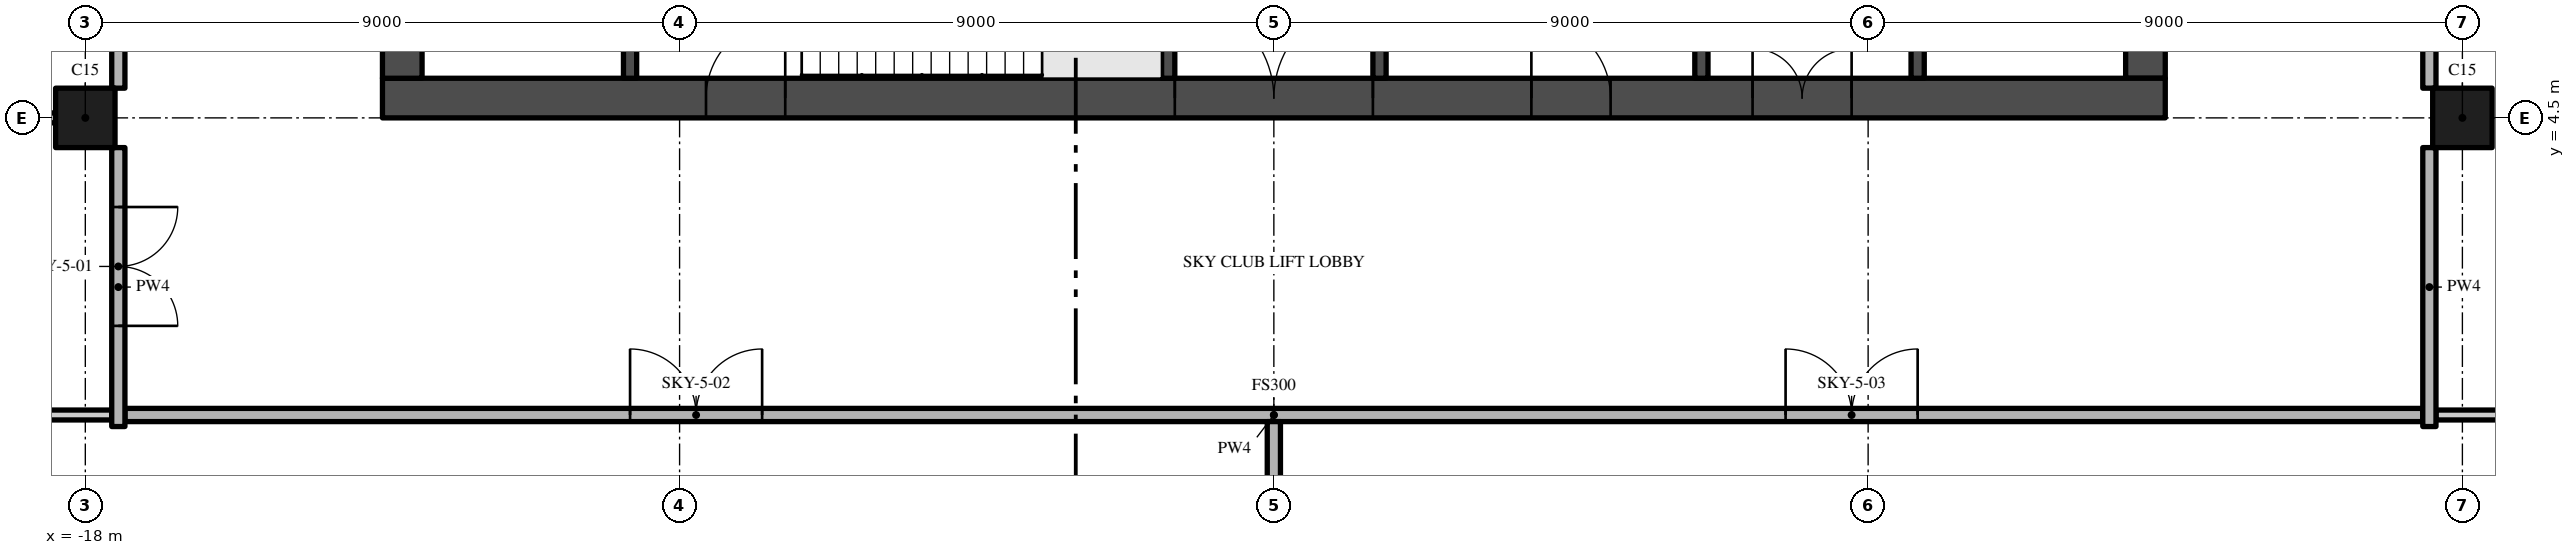
"""IFC4 building model, lengths in metres.
Left out: names, types, materials, properties, quantities, classifications, styles, units other than length and angle.
Written with IfcOpenShell. Run it as: python <this file> out.ifc"""

import sys

from ifc_helpers import new_model, si_unit, direction, frame, frame_2d, origin, origin_2d, place, context, subcontext, project, spatial, rectangle, extrude, element, fill, save


model = new_model("IFC4")
c1 = context("Model", 3, precision=1e-05, world=origin(), true_north=direction((0.0, 1.0)))
c2 = subcontext(c1, "Body", "Model", "MODEL_VIEW")
j1 = project(units=[si_unit("LENGTHUNIT", "METRE"), si_unit("PLANEANGLEUNIT", "RADIAN")], contexts=[c1])
p1 = place(None, origin())
s1 = spatial("IfcSite", under=j1, at=p1, CompositionType="ELEMENT")
p2 = place(p1, origin())
s2 = spatial("IfcBuilding", under=s1, at=p2, CompositionType="ELEMENT")
p3 = place(p2, frame((0.0, 0.0, 284.4)))
s3 = spatial("IfcBuildingStorey", under=s2, at=p3, CompositionType="ELEMENT", Elevation=284.4)
p4 = place(p3, frame((-13.5, 4.8, -0.3), z_axis=(0.0, 0.0, 1.0), x_axis=(1.0, 0.0, 0.0)))
e1 = element("IfcWall", 1, at=p4, inside=s3, PredefinedType="SHEAR", context=c2, shape_type="SweptSolid", body=[
    extrude(rectangle(XDim=27.0, YDim=0.6, at=frame_2d((13.5, 0.0))), origin(), (0.0, 0.0, 1.0), 5.0),
])
p5 = place(p4, frame((12.0, 0.0, 0.3)))
e2 = element("IfcOpeningElement", 2, at=p5, cuts=e1, PredefinedType="OPENING", context=c2, shape_type="SweptSolid", body=[
    extrude(rectangle(XDim=3.0, YDim=2.4, at=frame_2d((1.5, 1.2))), frame((0.0, 0.31, 0.0), z_axis=(0.0, -1.0, 0.0), x_axis=(1.0, 0.0, 0.0)), (0.0, 0.0, 1.0), 0.62),
])
p6 = place(p4, frame((4.9, 0.0, 0.3)))
e3 = element("IfcOpeningElement", 3, at=p6, cuts=e1, PredefinedType="OPENING", context=c2, shape_type="SweptSolid", body=[
    extrude(rectangle(XDim=1.2, YDim=2.2, at=frame_2d((0.6, 1.1))), frame((0.0, 0.31, 0.0), z_axis=(0.0, -1.0, 0.0), x_axis=(1.0, 0.0, 0.0)), (0.0, 0.0, 1.0), 0.62),
])
p7 = place(p4, frame((20.75, 0.0, 0.3)))
e4 = element("IfcOpeningElement", 4, at=p7, cuts=e1, PredefinedType="OPENING", context=c2, shape_type="SweptSolid", body=[
    extrude(rectangle(XDim=1.5, YDim=2.2, at=frame_2d((0.75, 1.1))), frame((0.0, 0.31, 0.0), z_axis=(0.0, -1.0, 0.0), x_axis=(1.0, 0.0, 0.0)), (0.0, 0.0, 1.0), 0.62),
])
p8 = place(p4, frame((17.4, 0.0, 0.3)))
e5 = element("IfcOpeningElement", 5, at=p8, cuts=e1, PredefinedType="OPENING", context=c2, shape_type="SweptSolid", body=[
    extrude(rectangle(XDim=1.2, YDim=2.2, at=frame_2d((0.6, 1.1))), frame((0.0, 0.31, 0.0), z_axis=(0.0, -1.0, 0.0), x_axis=(1.0, 0.0, 0.0)), (0.0, 0.0, 1.0), 0.62),
])
p9 = place(p3, frame((13.2, 5.1, -0.3), z_axis=(0.0, 0.0, 1.0), x_axis=(0.0, 1.0, 0.0)))
e6 = element("IfcWall", 6, at=p9, inside=s3, PredefinedType="SHEAR", context=c2, shape_type="SweptSolid", body=[
    extrude(rectangle(XDim=16.8, YDim=0.6, at=frame_2d((8.4, 0.0))), origin(), (0.0, 0.0, 1.0), 5.0),
])
p10 = place(p9, frame((6.3, 0.0, 0.3)))
e7 = element("IfcOpeningElement", 7, at=p10, cuts=e6, PredefinedType="OPENING", context=c2, shape_type="SweptSolid", body=[
    extrude(rectangle(XDim=1.2, YDim=2.2, at=frame_2d((0.6, 1.1))), frame((0.0, 0.31, 0.0), z_axis=(0.0, -1.0, 0.0), x_axis=(1.0, 0.0, 0.0)), (0.0, 0.0, 1.0), 0.62),
])
p11 = place(p3, frame((-13.2, 21.9, -0.3), z_axis=(0.0, 0.0, 1.0), x_axis=(0.0, -1.0, 0.0)))
e8 = element("IfcWall", 8, at=p11, inside=s3, PredefinedType="SHEAR", context=c2, shape_type="SweptSolid", body=[
    extrude(rectangle(XDim=16.8, YDim=0.6, at=frame_2d((8.4, 0.0))), origin(), (0.0, 0.0, 1.0), 5.0),
])
p12 = place(p11, frame((9.3, 0.0, 0.3)))
e9 = element("IfcOpeningElement", 9, at=p12, cuts=e8, PredefinedType="OPENING", context=c2, shape_type="SweptSolid", body=[
    extrude(rectangle(XDim=1.2, YDim=2.2, at=frame_2d((0.6, 1.1))), frame((0.0, 0.31, 0.0), z_axis=(0.0, -1.0, 0.0), x_axis=(1.0, 0.0, 0.0)), (0.0, 0.0, 1.0), 0.62),
])
for number, where, z_axis, x_axis in (
    (10, (-18.0, 4.5, 0.0), (0.0, 0.0, 1.0), (1.0, 0.0, 0.0)),
    (11, (18.0, 4.5, 0.0), (0.0, 0.0, 1.0), (1.0, 0.0, 0.0)),
):
    element("IfcColumn", number, at=place(p3, frame(where, z_axis=z_axis, x_axis=x_axis)), inside=s3, PredefinedType="COLUMN", context=c2, shape_type="SweptSolid", body=[
        extrude(rectangle(XDim=0.9, YDim=0.9, at=origin_2d()), origin(), (0.0, 0.0, 1.0), 4.7),
    ])
for number, where, z_axis, x_axis in (
    (12, (-9.75, 5.1, 0.0), (0.0, 0.0, 1.0), (0.0, 1.0, 0.0)),
    (13, (-1.6, 5.1, 0.0), (0.0, 0.0, 1.0), (0.0, 1.0, 0.0)),
):
    element("IfcWall", number, at=place(p3, frame(where, z_axis=z_axis, x_axis=x_axis)), inside=s3, PredefinedType="SHEAR", context=c2, shape_type="SweptSolid", body=[
        extrude(rectangle(XDim=2.85, YDim=0.2, at=frame_2d((1.425, 0.0))), origin(), (0.0, 0.0, 1.0), 4.7),
    ])
p13 = place(p3, frame((1.6, 11.5, 0.0), z_axis=(0.0, 0.0, 1.0), x_axis=(0.0, -1.0, 0.0)))
e14 = element("IfcWall", 14, at=p13, inside=s3, PredefinedType="SHEAR", context=c2, shape_type="SweptSolid", body=[
    extrude(rectangle(XDim=6.4, YDim=0.2, at=frame_2d((3.2, 0.0))), origin(), (0.0, 0.0, 1.0), 4.7),
])
p14 = place(p13, frame((2.35, 0.0, 0.0)))
e15 = element("IfcOpeningElement", 15, at=p14, cuts=e14, PredefinedType="OPENING", context=c2, shape_type="SweptSolid", body=[
    extrude(rectangle(XDim=0.9, YDim=2.1, at=frame_2d((0.45, 1.05))), frame((0.0, 0.11, 0.0), z_axis=(0.0, -1.0, 0.0), x_axis=(1.0, 0.0, 0.0)), (0.0, 0.0, 1.0), 0.22),
])
p15 = place(p3, frame((6.475, 5.1, 0.0), z_axis=(0.0, 0.0, 1.0), x_axis=(0.0, 1.0, 0.0)))
e16 = element("IfcWall", 16, at=p15, inside=s3, PredefinedType="SHEAR", context=c2, shape_type="SweptSolid", body=[
    extrude(rectangle(XDim=6.4, YDim=0.2, at=frame_2d((3.2, 0.0))), origin(), (0.0, 0.0, 1.0), 4.7),
])
p16 = place(p3, frame((9.75, 5.1, 0.0), z_axis=(0.0, 0.0, 1.0), x_axis=(0.0, 1.0, 0.0)))
e17 = element("IfcWall", 17, at=p16, inside=s3, PredefinedType="SHEAR", context=c2, shape_type="SweptSolid", body=[
    extrude(rectangle(XDim=2.5, YDim=0.2, at=frame_2d((1.25, 0.0))), origin(), (0.0, 0.0, 1.0), 4.7),
])
p17 = place(p16, frame((0.85, 0.0, 0.0)))
e18 = element("IfcOpeningElement", 18, at=p17, cuts=e17, PredefinedType="OPENING", context=c2, shape_type="SweptSolid", body=[
    extrude(rectangle(XDim=1.1, YDim=2.1, at=frame_2d((0.55, 1.05))), frame((0.0, 0.11, 0.0), z_axis=(0.0, -1.0, 0.0), x_axis=(1.0, 0.0, 0.0)), (0.0, 0.0, 1.0), 0.22),
])
p18 = place(p3, frame((-17.4, 0.0, 0.0), z_axis=(0.0, 0.0, 1.0), x_axis=(1.0, 0.0, 0.0)))
e19 = element("IfcWall", 19, at=p18, inside=s3, PredefinedType="PARTITIONING", context=c2, shape_type="SweptSolid", body=[
    extrude(rectangle(XDim=34.8, YDim=0.2, at=frame_2d((17.4, 0.0))), origin(), (0.0, 0.0, 1.0), 4.7),
])
p19 = place(p18, frame((7.65, 0.0, 0.0)))
e20 = element("IfcOpeningElement", 20, at=p19, cuts=e19, PredefinedType="OPENING", context=c2, shape_type="SweptSolid", body=[
    extrude(rectangle(XDim=2.0, YDim=2.4, at=frame_2d((1.0, 1.2))), frame((0.0, 0.11, 0.0), z_axis=(0.0, -1.0, 0.0), x_axis=(1.0, 0.0, 0.0)), (0.0, 0.0, 1.0), 0.22),
])
p20 = place(p18, frame((25.15, 0.0, 0.0)))
e21 = element("IfcOpeningElement", 21, at=p20, cuts=e19, PredefinedType="OPENING", context=c2, shape_type="SweptSolid", body=[
    extrude(rectangle(XDim=2.0, YDim=2.4, at=frame_2d((1.0, 1.2))), frame((0.0, 0.11, 0.0), z_axis=(0.0, -1.0, 0.0), x_axis=(1.0, 0.0, 0.0)), (0.0, 0.0, 1.0), 0.22),
])
for number, where, z_axis, x_axis in (
    (22, (-26.7, 0.0, 0.0), (0.0, 0.0, 1.0), (1.0, 0.0, 0.0)),
    (23, (17.6, 0.0, 0.0), (0.0, 0.0, 1.0), (1.0, 0.0, 0.0)),
):
    element("IfcWall", number, at=place(p3, frame(where, z_axis=z_axis, x_axis=x_axis)), inside=s3, PredefinedType="PARTITIONING", context=c2, shape_type="SweptSolid", body=[
        extrude(rectangle(XDim=9.1, YDim=0.15, at=frame_2d((4.55, 0.0))), origin(), (0.0, 0.0, 1.0), 4.7),
    ])
p21 = place(p3, frame((-22.425, 4.5, 0.0), z_axis=(0.0, 0.0, 1.0), x_axis=(1.0, 0.0, 0.0)))
e24 = element("IfcWall", 24, at=p21, inside=s3, PredefinedType="PARTITIONING", context=c2, shape_type="SweptSolid", body=[
    extrude(rectangle(XDim=3.975, YDim=0.15, at=frame_2d((1.988, 0.0))), origin(), (0.0, 0.0, 1.0), 4.7),
])
p22 = place(p3, frame((-17.5, 4.05, 0.0), z_axis=(0.0, 0.0, 1.0), x_axis=(0.0, -1.0, 0.0)))
e25 = element("IfcWall", 25, at=p22, inside=s3, PredefinedType="PARTITIONING", context=c2, shape_type="SweptSolid", body=[
    extrude(rectangle(XDim=4.225, YDim=0.2, at=frame_2d((2.112, 0.0))), origin(), (0.0, 0.0, 1.0), 4.7),
])
p23 = place(p22, frame((0.9, 0.0, 0.0)))
e26 = element("IfcOpeningElement", 26, at=p23, cuts=e25, PredefinedType="OPENING", context=c2, shape_type="SweptSolid", body=[
    extrude(rectangle(XDim=1.8, YDim=2.4, at=frame_2d((0.9, 1.2))), frame((0.0, 0.11, 0.0), z_axis=(0.0, -1.0, 0.0), x_axis=(1.0, 0.0, 0.0)), (0.0, 0.0, 1.0), 0.22),
])
p24 = place(p3, frame((-17.5, 4.95, 0.0), z_axis=(0.0, 0.0, 1.0), x_axis=(0.0, 1.0, 0.0)))
e27 = element("IfcWall", 27, at=p24, inside=s3, PredefinedType="PARTITIONING", context=c2, shape_type="SweptSolid", body=[
    extrude(rectangle(XDim=8.1, YDim=0.2, at=frame_2d((4.05, 0.0))), origin(), (0.0, 0.0, 1.0), 4.7),
])
p25 = place(p24, frame((1.35, 0.0, 0.0)))
e28 = element("IfcOpeningElement", 28, at=p25, cuts=e27, PredefinedType="OPENING", context=c2, shape_type="SweptSolid", body=[
    extrude(rectangle(XDim=0.9, YDim=2.1, at=frame_2d((0.45, 1.05))), frame((0.0, 0.11, 0.0), z_axis=(0.0, -1.0, 0.0), x_axis=(1.0, 0.0, 0.0)), (0.0, 0.0, 1.0), 0.22),
])
p26 = place(p24, frame((5.85, 0.0, 0.0)))
e29 = element("IfcOpeningElement", 29, at=p26, cuts=e27, PredefinedType="OPENING", context=c2, shape_type="SweptSolid", body=[
    extrude(rectangle(XDim=0.9, YDim=2.1, at=frame_2d((0.45, 1.05))), frame((0.0, 0.11, 0.0), z_axis=(0.0, -1.0, 0.0), x_axis=(1.0, 0.0, 0.0)), (0.0, 0.0, 1.0), 0.22),
])
p27 = place(p3, frame((0.0, -4.05, 0.0), z_axis=(0.0, 0.0, 1.0), x_axis=(0.0, 1.0, 0.0)))
e30 = element("IfcWall", 30, at=p27, inside=s3, PredefinedType="PARTITIONING", context=c2, shape_type="SweptSolid", body=[
    extrude(rectangle(XDim=3.95, YDim=0.2, at=frame_2d((1.975, 0.0))), origin(), (0.0, 0.0, 1.0), 4.7),
])
p28 = place(p3, frame((17.5, -0.175, 0.0), z_axis=(0.0, 0.0, 1.0), x_axis=(0.0, 1.0, 0.0)))
e31 = element("IfcWall", 31, at=p28, inside=s3, PredefinedType="PARTITIONING", context=c2, shape_type="SweptSolid", body=[
    extrude(rectangle(XDim=4.225, YDim=0.2, at=frame_2d((2.112, 0.0))), origin(), (0.0, 0.0, 1.0), 4.7),
])
p29 = place(p3, frame((17.5, 4.95, 0.0), z_axis=(0.0, 0.0, 1.0), x_axis=(0.0, 1.0, 0.0)))
e32 = element("IfcWall", 32, at=p29, inside=s3, PredefinedType="PARTITIONING", context=c2, shape_type="SweptSolid", body=[
    extrude(rectangle(XDim=8.1, YDim=0.2, at=frame_2d((4.05, 0.0))), origin(), (0.0, 0.0, 1.0), 4.7),
])
p30 = place(p29, frame((5.95, 0.0, 0.0)))
e33 = element("IfcOpeningElement", 33, at=p30, cuts=e32, PredefinedType="OPENING", context=c2, shape_type="SweptSolid", body=[
    extrude(rectangle(XDim=2.0, YDim=2.4, at=frame_2d((1.0, 1.2))), frame((0.0, 0.11, 0.0), z_axis=(0.0, -1.0, 0.0), x_axis=(1.0, 0.0, 0.0)), (0.0, 0.0, 1.0), 0.22),
])
p31 = place(p5, frame((3.0, 0.0, 0.0), z_axis=(0.0, 0.0, 1.0), x_axis=(-1.0, 0.0, 0.0)))
e34 = element("IfcDoor", 34, at=p31, inside=s3, OperationType="DOUBLE_DOOR_SINGLE_SWING", PredefinedType="DOOR", context=c2, shape_type="SweptSolid", body=[
    extrude(rectangle(XDim=3.0, YDim=2.4, at=frame_2d((1.5, 1.2))), frame((0.0, 0.025, 0.0), z_axis=(0.0, -1.0, 0.0), x_axis=(1.0, 0.0, 0.0)), (0.0, 0.0, 1.0), 0.05),
])
fill(e2, e34)
p32 = place(p6, frame((1.2, 0.0, 0.0), z_axis=(0.0, 0.0, 1.0), x_axis=(-1.0, 0.0, 0.0)))
e35 = element("IfcDoor", 35, at=p32, inside=s3, OperationType="SINGLE_SWING_LEFT", PredefinedType="DOOR", context=c2, shape_type="SweptSolid", body=[
    extrude(rectangle(XDim=1.2, YDim=2.2, at=frame_2d((0.6, 1.1))), frame((0.0, 0.025, 0.0), z_axis=(0.0, -1.0, 0.0), x_axis=(1.0, 0.0, 0.0)), (0.0, 0.0, 1.0), 0.05),
])
fill(e3, e35)
p33 = place(p7, frame((1.5, 0.0, 0.0), z_axis=(0.0, 0.0, 1.0), x_axis=(-1.0, 0.0, 0.0)))
e36 = element("IfcDoor", 36, at=p33, inside=s3, OperationType="DOUBLE_DOOR_SINGLE_SWING", PredefinedType="DOOR", context=c2, shape_type="SweptSolid", body=[
    extrude(rectangle(XDim=1.5, YDim=2.2, at=frame_2d((0.75, 1.1))), frame((0.0, 0.025, 0.0), z_axis=(0.0, -1.0, 0.0), x_axis=(1.0, 0.0, 0.0)), (0.0, 0.0, 1.0), 0.05),
])
fill(e4, e36)
p34 = place(p8, frame((1.2, 0.0, 0.0), z_axis=(0.0, 0.0, 1.0), x_axis=(-1.0, 0.0, 0.0)))
e37 = element("IfcDoor", 37, at=p34, inside=s3, OperationType="SINGLE_SWING_RIGHT", PredefinedType="DOOR", context=c2, shape_type="SweptSolid", body=[
    extrude(rectangle(XDim=1.2, YDim=2.2, at=frame_2d((0.6, 1.1))), frame((0.0, 0.025, 0.0), z_axis=(0.0, -1.0, 0.0), x_axis=(1.0, 0.0, 0.0)), (0.0, 0.0, 1.0), 0.05),
])
fill(e5, e37)
p35 = place(p23, origin())
e38 = element("IfcDoor", 38, at=p35, inside=s3, OperationType="DOUBLE_DOOR_SINGLE_SWING", PredefinedType="DOOR", context=c2, shape_type="SweptSolid", body=[
    extrude(rectangle(XDim=1.8, YDim=2.4, at=frame_2d((0.9, 1.2))), frame((0.0, 0.025, 0.0), z_axis=(0.0, -1.0, 0.0), x_axis=(1.0, 0.0, 0.0)), (0.0, 0.0, 1.0), 0.05),
])
fill(e26, e38)
p36 = place(p19, origin())
e39 = element("IfcDoor", 39, at=p36, inside=s3, OperationType="DOUBLE_DOOR_SINGLE_SWING", PredefinedType="DOOR", context=c2, shape_type="SweptSolid", body=[
    extrude(rectangle(XDim=2.0, YDim=2.4, at=frame_2d((1.0, 1.2))), frame((0.0, 0.025, 0.0), z_axis=(0.0, -1.0, 0.0), x_axis=(1.0, 0.0, 0.0)), (0.0, 0.0, 1.0), 0.05),
])
fill(e20, e39)
p37 = place(p20, origin())
e40 = element("IfcDoor", 40, at=p37, inside=s3, OperationType="DOUBLE_DOOR_SINGLE_SWING", PredefinedType="DOOR", context=c2, shape_type="SweptSolid", body=[
    extrude(rectangle(XDim=2.0, YDim=2.4, at=frame_2d((1.0, 1.2))), frame((0.0, 0.025, 0.0), z_axis=(0.0, -1.0, 0.0), x_axis=(1.0, 0.0, 0.0)), (0.0, 0.0, 1.0), 0.05),
])
fill(e21, e40)
save(model, sys.argv[1])
